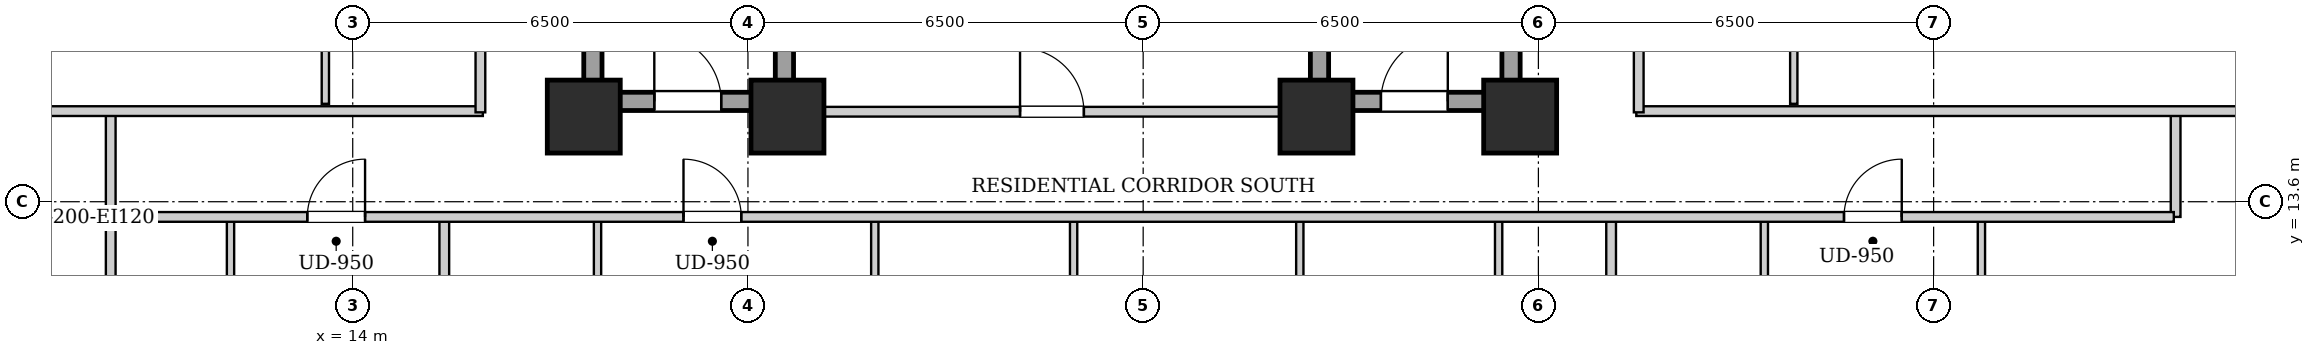
"""IFC4 building model, lengths in metres.
Left out: names, types, materials, properties, quantities, classifications, styles, units other than length and angle.
Written with IfcOpenShell. Run it as: python <this file> out.ifc"""

import sys

from ifc_helpers import new_model, si_unit, direction, frame, frame_2d, origin, origin_2d, place, context, subcontext, project, spatial, rectangle, extrude, element, fill, save


model = new_model("IFC4")
c1 = context("Model", 3, precision=1e-05, world=origin(), true_north=direction((0.0, 1.0)))
c2 = subcontext(c1, "Body", "Model", "MODEL_VIEW")
j1 = project(units=[si_unit("LENGTHUNIT", "METRE"), si_unit("PLANEANGLEUNIT", "RADIAN")], contexts=[c1])
p1 = place(None, origin())
s1 = spatial("IfcSite", under=j1, at=p1, CompositionType="ELEMENT")
p2 = place(p1, origin())
s2 = spatial("IfcBuilding", under=s1, at=p2, CompositionType="ELEMENT")
p3 = place(p2, frame((0.0, 0.0, 32.2)))
s3 = spatial("IfcBuildingStorey", under=s2, at=p3, CompositionType="ELEMENT", Elevation=32.2)
for number, where, z_axis, x_axis in (
    (1, (17.8, 15.0, 0.0), (0.0, 0.0, 1.0), (1.0, 0.0, 0.0)),
    (2, (21.15, 15.0, 0.0), (0.0, 0.0, 1.0), (1.0, 0.0, 0.0)),
    (3, (29.85, 15.0, 0.0), (0.0, 0.0, 1.0), (1.0, 0.0, 0.0)),
    (4, (33.2, 15.0, 0.0), (0.0, 0.0, 1.0), (1.0, 0.0, 0.0)),
):
    element("IfcColumn", number, at=place(p3, frame(where, z_axis=z_axis, x_axis=x_axis)), inside=s3, PredefinedType="COLUMN", context=c2, shape_type="SweptSolid", body=[
        extrude(rectangle(XDim=1.2, YDim=1.2, at=origin_2d()), origin(), (0.0, 0.0, 1.0), 3.2),
    ])
for number, where, z_axis, x_axis in (
    (5, (17.95, 15.1, 0.0), (0.0, 0.0, 1.0), (0.0, 1.0, 0.0)),
    (6, (21.1, 15.1, 0.0), (0.0, 0.0, 1.0), (0.0, 1.0, 0.0)),
):
    element("IfcWall", number, at=place(p3, frame(where, z_axis=z_axis, x_axis=x_axis)), inside=s3, PredefinedType="SHEAR", context=c2, shape_type="SweptSolid", body=[
        extrude(rectangle(XDim=9.0, YDim=0.3, at=frame_2d((4.5, 0.0))), origin(), (0.0, 0.0, 1.0), 2.94),
    ])
p4 = place(p3, frame((18.1, 15.25, 0.0), z_axis=(0.0, 0.0, 1.0), x_axis=(1.0, 0.0, 0.0)))
e7 = element("IfcWall", 7, at=p4, inside=s3, PredefinedType="SHEAR", context=c2, shape_type="SweptSolid", body=[
    extrude(rectangle(XDim=2.85, YDim=0.3, at=frame_2d((1.425, 0.0))), origin(), (0.0, 0.0, 1.0), 2.94),
])
p5 = place(p4, frame((0.86, 0.0, 0.0)))
e8 = element("IfcOpeningElement", 8, at=p5, cuts=e7, PredefinedType="OPENING", context=c2, shape_type="SweptSolid", body=[
    extrude(rectangle(XDim=1.1, YDim=2.05, at=frame_2d((0.55, 1.025))), frame((0.0, 0.16, 0.0), z_axis=(0.0, -1.0, 0.0), x_axis=(1.0, 0.0, 0.0)), (0.0, 0.0, 1.0), 0.32),
])
for number, where, z_axis, x_axis in (
    (9, (29.9, 15.1, 0.0), (0.0, 0.0, 1.0), (0.0, 1.0, 0.0)),
    (10, (33.05, 15.1, 0.0), (0.0, 0.0, 1.0), (0.0, 1.0, 0.0)),
):
    element("IfcWall", number, at=place(p3, frame(where, z_axis=z_axis, x_axis=x_axis)), inside=s3, PredefinedType="SHEAR", context=c2, shape_type="SweptSolid", body=[
        extrude(rectangle(XDim=9.0, YDim=0.3, at=frame_2d((4.5, 0.0))), origin(), (0.0, 0.0, 1.0), 2.94),
    ])
p6 = place(p3, frame((30.05, 15.25, 0.0), z_axis=(0.0, 0.0, 1.0), x_axis=(1.0, 0.0, 0.0)))
e11 = element("IfcWall", 11, at=p6, inside=s3, PredefinedType="SHEAR", context=c2, shape_type="SweptSolid", body=[
    extrude(rectangle(XDim=2.85, YDim=0.3, at=frame_2d((1.425, 0.0))), origin(), (0.0, 0.0, 1.0), 2.94),
])
p7 = place(p6, frame((0.86, 0.0, 0.0)))
e12 = element("IfcOpeningElement", 12, at=p7, cuts=e11, PredefinedType="OPENING", context=c2, shape_type="SweptSolid", body=[
    extrude(rectangle(XDim=1.1, YDim=2.05, at=frame_2d((0.55, 1.025))), frame((0.0, 0.16, 0.0), z_axis=(0.0, -1.0, 0.0), x_axis=(1.0, 0.0, 0.0)), (0.0, 0.0, 1.0), 0.32),
])
p8 = place(p3, frame((21.25, 15.08, 0.0), z_axis=(0.0, 0.0, 1.0), x_axis=(1.0, 0.0, 0.0)))
e13 = element("IfcWall", 13, at=p8, inside=s3, PredefinedType="PARTITIONING", context=c2, shape_type="SweptSolid", body=[
    extrude(rectangle(XDim=8.5, YDim=0.16, at=frame_2d((4.25, 0.0))), origin(), (0.0, 0.0, 1.0), 2.155),
])
p9 = place(p8, frame((3.725, 0.0, 0.0)))
e14 = element("IfcOpeningElement", 14, at=p9, cuts=e13, PredefinedType="OPENING", context=c2, shape_type="SweptSolid", body=[
    extrude(rectangle(XDim=1.05, YDim=2.05, at=frame_2d((0.525, 1.025))), frame((0.0, 0.09, 0.0), z_axis=(0.0, -1.0, 0.0), x_axis=(1.0, 0.0, 0.0)), (0.0, 0.0, 1.0), 0.18),
])
for number, where, z_axis, x_axis in (
    (15, (10.02, 13.35, 0.0), (0.0, 0.0, 1.0), (0.0, 1.0, 0.0)),
    (16, (43.98, 13.35, 0.0), (0.0, 0.0, 1.0), (0.0, 1.0, 0.0)),
):
    element("IfcWall", number, at=place(p3, frame(where, z_axis=z_axis, x_axis=x_axis)), inside=s3, PredefinedType="PARTITIONING", context=c2, shape_type="SweptSolid", body=[
        extrude(rectangle(XDim=1.74, YDim=0.16, at=frame_2d((0.87, 0.0))), origin(), (0.0, 0.0, 1.0), 2.94),
    ])
p10 = place(p3, frame((7.78, 15.09, 0.0), z_axis=(0.0, 0.0, 1.0), x_axis=(1.0, 0.0, 0.0)))
e17 = element("IfcWall", 17, at=p10, inside=s3, PredefinedType="PARTITIONING", context=c2, shape_type="SweptSolid", body=[
    extrude(rectangle(XDim=8.36, YDim=0.16, at=frame_2d((4.18, 0.0))), origin(), (0.0, 0.0, 1.0), 2.155),
])
p11 = place(p3, frame((35.11, 15.09, 0.0), z_axis=(0.0, 0.0, 1.0), x_axis=(1.0, 0.0, 0.0)))
e18 = element("IfcWall", 18, at=p11, inside=s3, PredefinedType="PARTITIONING", context=c2, shape_type="SweptSolid", body=[
    extrude(rectangle(XDim=11.11, YDim=0.16, at=frame_2d((5.555, 0.0))), origin(), (0.0, 0.0, 1.0), 2.155),
])
p12 = place(p3, frame((10.02, 10.4, 0.0), z_axis=(0.0, 0.0, 1.0), x_axis=(0.0, 1.0, 0.0)))
e19 = element("IfcWall", 19, at=p12, inside=s3, PredefinedType="PARTITIONING", context=c2, shape_type="SweptSolid", body=[
    extrude(rectangle(XDim=2.91, YDim=0.16, at=frame_2d((1.455, 0.0))), origin(), (0.0, 0.0, 1.0), 2.94),
])
p13 = place(p3, frame((11.99, 10.46, 0.0), z_axis=(0.0, 0.0, 1.0), x_axis=(0.0, 1.0, 0.0)))
e20 = element("IfcWall", 20, at=p13, inside=s3, PredefinedType="PARTITIONING", context=c2, shape_type="SweptSolid", body=[
    extrude(rectangle(XDim=2.85, YDim=0.12, at=frame_2d((1.425, 0.0))), origin(), (0.0, 0.0, 1.0), 2.94),
])
p14 = place(p13, frame((0.995, 0.0, 0.0)))
e21 = element("IfcOpeningElement", 21, at=p14, cuts=e20, PredefinedType="OPENING", context=c2, shape_type="SweptSolid", body=[
    extrude(rectangle(XDim=0.86, YDim=2.05, at=frame_2d((0.43, 1.025))), frame((0.0, 0.07, 0.0), z_axis=(0.0, -1.0, 0.0), x_axis=(1.0, 0.0, 0.0)), (0.0, 0.0, 1.0), 0.14),
])
p15 = place(p3, frame((15.506, 2.26, 0.0), z_axis=(0.0, 0.0, 1.0), x_axis=(0.0, 1.0, 0.0)))
e22 = element("IfcWall", 22, at=p15, inside=s3, PredefinedType="PARTITIONING", context=c2, shape_type="SweptSolid", body=[
    extrude(rectangle(XDim=11.05, YDim=0.16, at=frame_2d((5.525, 0.0))), origin(), (0.0, 0.0, 1.0), 2.94),
])
p16 = place(p3, frame((18.026, 10.46, 0.0), z_axis=(0.0, 0.0, 1.0), x_axis=(0.0, 1.0, 0.0)))
e23 = element("IfcWall", 23, at=p16, inside=s3, PredefinedType="PARTITIONING", context=c2, shape_type="SweptSolid", body=[
    extrude(rectangle(XDim=2.85, YDim=0.12, at=frame_2d((1.425, 0.0))), origin(), (0.0, 0.0, 1.0), 2.94),
])
p17 = place(p16, frame((0.995, 0.0, 0.0)))
e24 = element("IfcOpeningElement", 24, at=p17, cuts=e23, PredefinedType="OPENING", context=c2, shape_type="SweptSolid", body=[
    extrude(rectangle(XDim=0.86, YDim=2.05, at=frame_2d((0.43, 1.025))), frame((0.0, 0.07, 0.0), z_axis=(0.0, -1.0, 0.0), x_axis=(1.0, 0.0, 0.0)), (0.0, 0.0, 1.0), 0.14),
])
p18 = place(p3, frame((22.586, 10.46, 0.0), z_axis=(0.0, 0.0, 1.0), x_axis=(0.0, 1.0, 0.0)))
e25 = element("IfcWall", 25, at=p18, inside=s3, PredefinedType="PARTITIONING", context=c2, shape_type="SweptSolid", body=[
    extrude(rectangle(XDim=2.85, YDim=0.12, at=frame_2d((1.425, 0.0))), origin(), (0.0, 0.0, 1.0), 2.94),
])
p19 = place(p18, frame((0.975, 0.0, 0.0)))
e26 = element("IfcOpeningElement", 26, at=p19, cuts=e25, PredefinedType="OPENING", context=c2, shape_type="SweptSolid", body=[
    extrude(rectangle(XDim=0.9, YDim=2.05, at=frame_2d((0.45, 1.025))), frame((0.0, 0.07, 0.0), z_axis=(0.0, -1.0, 0.0), x_axis=(1.0, 0.0, 0.0)), (0.0, 0.0, 1.0), 0.14),
])
p20 = place(p3, frame((25.856, 10.46, 0.0), z_axis=(0.0, 0.0, 1.0), x_axis=(0.0, 1.0, 0.0)))
e27 = element("IfcWall", 27, at=p20, inside=s3, PredefinedType="PARTITIONING", context=c2, shape_type="SweptSolid", body=[
    extrude(rectangle(XDim=2.85, YDim=0.12, at=frame_2d((1.425, 0.0))), origin(), (0.0, 0.0, 1.0), 2.94),
])
p21 = place(p20, frame((0.975, 0.0, 0.0)))
e28 = element("IfcOpeningElement", 28, at=p21, cuts=e27, PredefinedType="OPENING", context=c2, shape_type="SweptSolid", body=[
    extrude(rectangle(XDim=0.9, YDim=2.05, at=frame_2d((0.45, 1.025))), frame((0.0, 0.07, 0.0), z_axis=(0.0, -1.0, 0.0), x_axis=(1.0, 0.0, 0.0)), (0.0, 0.0, 1.0), 0.14),
])
p22 = place(p3, frame((29.576, 10.46, 0.0), z_axis=(0.0, 0.0, 1.0), x_axis=(0.0, 1.0, 0.0)))
e29 = element("IfcWall", 29, at=p22, inside=s3, PredefinedType="PARTITIONING", context=c2, shape_type="SweptSolid", body=[
    extrude(rectangle(XDim=2.85, YDim=0.12, at=frame_2d((1.425, 0.0))), origin(), (0.0, 0.0, 1.0), 2.94),
])
p23 = place(p22, frame((0.975, 0.0, 0.0)))
e30 = element("IfcOpeningElement", 30, at=p23, cuts=e29, PredefinedType="OPENING", context=c2, shape_type="SweptSolid", body=[
    extrude(rectangle(XDim=0.9, YDim=2.05, at=frame_2d((0.45, 1.025))), frame((0.0, 0.07, 0.0), z_axis=(0.0, -1.0, 0.0), x_axis=(1.0, 0.0, 0.0)), (0.0, 0.0, 1.0), 0.14),
])
p24 = place(p3, frame((32.846, 10.46, 0.0), z_axis=(0.0, 0.0, 1.0), x_axis=(0.0, 1.0, 0.0)))
e31 = element("IfcWall", 31, at=p24, inside=s3, PredefinedType="PARTITIONING", context=c2, shape_type="SweptSolid", body=[
    extrude(rectangle(XDim=2.85, YDim=0.12, at=frame_2d((1.425, 0.0))), origin(), (0.0, 0.0, 1.0), 2.94),
])
p25 = place(p24, frame((0.975, 0.0, 0.0)))
e32 = element("IfcOpeningElement", 32, at=p25, cuts=e31, PredefinedType="OPENING", context=c2, shape_type="SweptSolid", body=[
    extrude(rectangle(XDim=0.9, YDim=2.05, at=frame_2d((0.45, 1.025))), frame((0.0, 0.07, 0.0), z_axis=(0.0, -1.0, 0.0), x_axis=(1.0, 0.0, 0.0)), (0.0, 0.0, 1.0), 0.14),
])
p26 = place(p3, frame((34.696, 0.28, 0.0), z_axis=(0.0, 0.0, 1.0), x_axis=(0.0, 1.0, 0.0)))
e33 = element("IfcWall", 33, at=p26, inside=s3, PredefinedType="PARTITIONING", context=c2, shape_type="SweptSolid", body=[
    extrude(rectangle(XDim=13.03, YDim=0.16, at=frame_2d((6.515, 0.0))), origin(), (0.0, 0.0, 1.0), 2.94),
])
p27 = place(p3, frame((37.216, 10.46, 0.0), z_axis=(0.0, 0.0, 1.0), x_axis=(0.0, 1.0, 0.0)))
e34 = element("IfcWall", 34, at=p27, inside=s3, PredefinedType="PARTITIONING", context=c2, shape_type="SweptSolid", body=[
    extrude(rectangle(XDim=2.85, YDim=0.12, at=frame_2d((1.425, 0.0))), origin(), (0.0, 0.0, 1.0), 2.94),
])
p28 = place(p27, frame((0.995, 0.0, 0.0)))
e35 = element("IfcOpeningElement", 35, at=p28, cuts=e34, PredefinedType="OPENING", context=c2, shape_type="SweptSolid", body=[
    extrude(rectangle(XDim=0.86, YDim=2.05, at=frame_2d((0.43, 1.025))), frame((0.0, 0.07, 0.0), z_axis=(0.0, -1.0, 0.0), x_axis=(1.0, 0.0, 0.0)), (0.0, 0.0, 1.0), 0.14),
])
p29 = place(p3, frame((40.786, 10.46, 0.0), z_axis=(0.0, 0.0, 1.0), x_axis=(0.0, 1.0, 0.0)))
e36 = element("IfcWall", 36, at=p29, inside=s3, PredefinedType="PARTITIONING", context=c2, shape_type="SweptSolid", body=[
    extrude(rectangle(XDim=2.85, YDim=0.12, at=frame_2d((1.425, 0.0))), origin(), (0.0, 0.0, 1.0), 2.94),
])
p30 = place(p29, frame((0.975, 0.0, 0.0)))
e37 = element("IfcOpeningElement", 37, at=p30, cuts=e36, PredefinedType="OPENING", context=c2, shape_type="SweptSolid", body=[
    extrude(rectangle(XDim=0.9, YDim=2.05, at=frame_2d((0.45, 1.025))), frame((0.0, 0.07, 0.0), z_axis=(0.0, -1.0, 0.0), x_axis=(1.0, 0.0, 0.0)), (0.0, 0.0, 1.0), 0.14),
])
for number, where, z_axis, x_axis in (
    (38, (13.55, 15.21, 0.0), (0.0, 0.0, 1.0), (0.0, 1.0, 0.0)),
    (39, (37.7, 15.21, 0.0), (0.0, 0.0, 1.0), (0.0, 1.0, 0.0)),
):
    element("IfcWall", number, at=place(p3, frame(where, z_axis=z_axis, x_axis=x_axis)), inside=s3, PredefinedType="PARTITIONING", context=c2, shape_type="SweptSolid", body=[
        extrude(rectangle(XDim=2.159, YDim=0.12, at=frame_2d((1.08, 0.0))), origin(), (0.0, 0.0, 1.0), 2.94),
    ])
p31 = place(p3, frame((10.05, 13.35, 0.0), z_axis=(0.0, 0.0, 1.0), x_axis=(1.0, 0.0, 0.0)))
e40 = element("IfcWall", 40, at=p31, inside=s3, PredefinedType="PARTITIONING", context=c2, shape_type="SweptSolid", body=[
    extrude(rectangle(XDim=33.9, YDim=0.16, at=frame_2d((16.95, 0.0))), origin(), (0.0, 0.0, 1.0), 2.94),
])
p32 = place(p31, frame((3.203, 0.0, 0.0)))
e41 = element("IfcOpeningElement", 41, at=p32, cuts=e40, PredefinedType="OPENING", context=c2, shape_type="SweptSolid", body=[
    extrude(rectangle(XDim=0.95, YDim=2.1, at=frame_2d((0.475, 1.05))), frame((0.0, 0.09, 0.0), z_axis=(0.0, -1.0, 0.0), x_axis=(1.0, 0.0, 0.0)), (0.0, 0.0, 1.0), 0.18),
])
p33 = place(p31, frame((9.39, 0.0, 0.0)))
e42 = element("IfcOpeningElement", 42, at=p33, cuts=e40, PredefinedType="OPENING", context=c2, shape_type="SweptSolid", body=[
    extrude(rectangle(XDim=0.95, YDim=2.1, at=frame_2d((0.475, 1.05))), frame((0.0, 0.09, 0.0), z_axis=(0.0, -1.0, 0.0), x_axis=(1.0, 0.0, 0.0)), (0.0, 0.0, 1.0), 0.18),
])
p34 = place(p31, frame((28.476, 0.0, 0.0)))
e43 = element("IfcOpeningElement", 43, at=p34, cuts=e40, PredefinedType="OPENING", context=c2, shape_type="SweptSolid", body=[
    extrude(rectangle(XDim=0.95, YDim=2.1, at=frame_2d((0.475, 1.05))), frame((0.0, 0.09, 0.0), z_axis=(0.0, -1.0, 0.0), x_axis=(1.0, 0.0, 0.0)), (0.0, 0.0, 1.0), 0.18),
])
p35 = place(p3, frame((16.1, 15.07, 0.0), z_axis=(0.0, 0.0, 1.0), x_axis=(0.0, 1.0, 0.0)))
e44 = element("IfcWall", 44, at=p35, inside=s3, PredefinedType="PARTITIONING", context=c2, shape_type="SweptSolid", body=[
    extrude(rectangle(XDim=13.93, YDim=0.16, at=frame_2d((6.965, 0.0))), origin(), (0.0, 0.0, 1.0), 2.94),
])
p36 = place(p35, frame((4.661, 0.0, 0.0)))
e45 = element("IfcOpeningElement", 45, at=p36, cuts=e44, PredefinedType="OPENING", context=c2, shape_type="SweptSolid", body=[
    extrude(rectangle(XDim=0.95, YDim=2.1, at=frame_2d((0.475, 1.05))), frame((0.0, 0.09, 0.0), z_axis=(0.0, -1.0, 0.0), x_axis=(1.0, 0.0, 0.0)), (0.0, 0.0, 1.0), 0.18),
])
p37 = place(p35, frame((11.411, 0.0, 0.0)))
e46 = element("IfcOpeningElement", 46, at=p37, cuts=e44, PredefinedType="OPENING", context=c2, shape_type="SweptSolid", body=[
    extrude(rectangle(XDim=0.95, YDim=2.1, at=frame_2d((0.475, 1.05))), frame((0.0, 0.09, 0.0), z_axis=(0.0, -1.0, 0.0), x_axis=(1.0, 0.0, 0.0)), (0.0, 0.0, 1.0), 0.18),
])
p38 = place(p3, frame((35.15, 15.07, 0.0), z_axis=(0.0, 0.0, 1.0), x_axis=(0.0, 1.0, 0.0)))
e47 = element("IfcWall", 47, at=p38, inside=s3, PredefinedType="PARTITIONING", context=c2, shape_type="SweptSolid", body=[
    extrude(rectangle(XDim=13.93, YDim=0.16, at=frame_2d((6.965, 0.0))), origin(), (0.0, 0.0, 1.0), 2.94),
])
p39 = place(p38, frame((4.661, 0.0, 0.0)))
e48 = element("IfcOpeningElement", 48, at=p39, cuts=e47, PredefinedType="OPENING", context=c2, shape_type="SweptSolid", body=[
    extrude(rectangle(XDim=0.95, YDim=2.1, at=frame_2d((0.475, 1.05))), frame((0.0, 0.09, 0.0), z_axis=(0.0, -1.0, 0.0), x_axis=(1.0, 0.0, 0.0)), (0.0, 0.0, 1.0), 0.18),
])
p40 = place(p38, frame((11.411, 0.0, 0.0)))
e49 = element("IfcOpeningElement", 49, at=p40, cuts=e47, PredefinedType="OPENING", context=c2, shape_type="SweptSolid", body=[
    extrude(rectangle(XDim=0.95, YDim=2.1, at=frame_2d((0.475, 1.05))), frame((0.0, 0.09, 0.0), z_axis=(0.0, -1.0, 0.0), x_axis=(1.0, 0.0, 0.0)), (0.0, 0.0, 1.0), 0.18),
])
p41 = place(p5, origin())
e50 = element("IfcDoor", 50, at=p41, inside=s3, OperationType="SINGLE_SWING_LEFT", PredefinedType="DOOR", context=c2, shape_type="SweptSolid", body=[
    extrude(rectangle(XDim=1.1, YDim=2.05, at=frame_2d((0.55, 1.025))), frame((0.0, 0.025, 0.0), z_axis=(0.0, -1.0, 0.0), x_axis=(1.0, 0.0, 0.0)), (0.0, 0.0, 1.0), 0.05),
])
fill(e8, e50)
p42 = place(p7, origin())
e51 = element("IfcDoor", 51, at=p42, inside=s3, OperationType="SINGLE_SWING_RIGHT", PredefinedType="DOOR", context=c2, shape_type="SweptSolid", body=[
    extrude(rectangle(XDim=1.1, YDim=2.05, at=frame_2d((0.55, 1.025))), frame((0.0, 0.025, 0.0), z_axis=(0.0, -1.0, 0.0), x_axis=(1.0, 0.0, 0.0)), (0.0, 0.0, 1.0), 0.05),
])
fill(e12, e51)
p43 = place(p9, origin())
e52 = element("IfcDoor", 52, at=p43, inside=s3, OperationType="SINGLE_SWING_LEFT", PredefinedType="DOOR", context=c2, shape_type="SweptSolid", body=[
    extrude(rectangle(XDim=1.05, YDim=2.05, at=frame_2d((0.525, 1.025))), frame((0.0, 0.025, 0.0), z_axis=(0.0, -1.0, 0.0), x_axis=(1.0, 0.0, 0.0)), (0.0, 0.0, 1.0), 0.05),
])
fill(e14, e52)
p44 = place(p32, origin())
e53 = element("IfcDoor", 53, at=p44, inside=s3, OperationType="SINGLE_SWING_RIGHT", PredefinedType="DOOR", context=c2, shape_type="SweptSolid", body=[
    extrude(rectangle(XDim=0.95, YDim=2.1, at=frame_2d((0.475, 1.05))), frame((0.0, 0.025, 0.0), z_axis=(0.0, -1.0, 0.0), x_axis=(1.0, 0.0, 0.0)), (0.0, 0.0, 1.0), 0.05),
])
fill(e41, e53)
p45 = place(p33, origin())
e54 = element("IfcDoor", 54, at=p45, inside=s3, OperationType="SINGLE_SWING_LEFT", PredefinedType="DOOR", context=c2, shape_type="SweptSolid", body=[
    extrude(rectangle(XDim=0.95, YDim=2.1, at=frame_2d((0.475, 1.05))), frame((0.0, 0.025, 0.0), z_axis=(0.0, -1.0, 0.0), x_axis=(1.0, 0.0, 0.0)), (0.0, 0.0, 1.0), 0.05),
])
fill(e42, e54)
p46 = place(p34, origin())
e55 = element("IfcDoor", 55, at=p46, inside=s3, OperationType="SINGLE_SWING_RIGHT", PredefinedType="DOOR", context=c2, shape_type="SweptSolid", body=[
    extrude(rectangle(XDim=0.95, YDim=2.1, at=frame_2d((0.475, 1.05))), frame((0.0, 0.025, 0.0), z_axis=(0.0, -1.0, 0.0), x_axis=(1.0, 0.0, 0.0)), (0.0, 0.0, 1.0), 0.05),
])
fill(e43, e55)
save(model, sys.argv[1])
